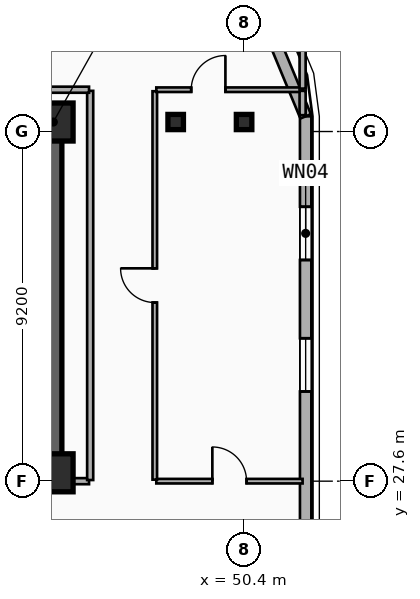
"""IFC4 building model, lengths in metres.
Left out: names, types, materials, properties, quantities, classifications, styles, units other than length and angle.
Written with IfcOpenShell. Run it as: python <this file> out.ifc"""

import sys

from ifc_helpers import new_model, si_unit, direction, frame, frame_2d, origin, origin_2d, place, context, subcontext, project, spatial, rectangle, i_section, extrude, element, fill, save


model = new_model("IFC4")
c1 = context("Model", 3, precision=1e-05, world=origin(), true_north=direction((0.0, 1.0)))
c2 = subcontext(c1, "Body", "Model", "MODEL_VIEW")
j1 = project(units=[si_unit("LENGTHUNIT", "METRE"), si_unit("PLANEANGLEUNIT", "RADIAN")], contexts=[c1])
p1 = place(None, origin())
s1 = spatial("IfcSite", under=j1, at=p1, CompositionType="ELEMENT")
p2 = place(p1, origin())
s2 = spatial("IfcBuilding", under=s1, at=p2, CompositionType="ELEMENT")
p3 = place(p2, frame((0.0, 0.0, 214.8)))
s3 = spatial("IfcBuildingStorey", under=s2, at=p3, CompositionType="ELEMENT", Elevation=214.8)
p4 = place(p3, frame((12.15, 37.05, 0.0), z_axis=(0.0, 0.0, 1.0), x_axis=(1.0, 0.0, 0.0)))
e1 = element("IfcWall", 1, at=p4, inside=s3, PredefinedType="SHEAR", context=c2, shape_type="SweptSolid", body=[
    extrude(rectangle(XDim=33.23, YDim=0.45, at=frame_2d((16.615, 0.0))), origin(), (0.0, 0.0, 1.0), 3.6),
])
p5 = place(p3, frame((45.38, 27.82, 0.0), z_axis=(0.0, 0.0, 1.0), x_axis=(-1.0, 0.0, 0.0)))
e2 = element("IfcWall", 2, at=p5, inside=s3, PredefinedType="SHEAR", context=c2, shape_type="SweptSolid", body=[
    extrude(rectangle(XDim=12.23, YDim=0.45, at=frame_2d((6.115, 0.0))), origin(), (0.0, 0.0, 1.0), 3.6),
])
p6 = place(p5, frame((9.93, 0.0, 0.0)))
e3 = element("IfcOpeningElement", 3, at=p6, cuts=e2, PredefinedType="OPENING", context=c2, shape_type="SweptSolid", body=[
    extrude(rectangle(XDim=1.1, YDim=2.15, at=frame_2d((0.55, 1.075))), frame((0.0, 0.235, 0.0), z_axis=(0.0, -1.0, 0.0), x_axis=(1.0, 0.0, 0.0)), (0.0, 0.0, 1.0), 0.47),
])
p7 = place(p5, frame((6.23, 0.0, 0.0)))
e4 = element("IfcOpeningElement", 4, at=p7, cuts=e2, PredefinedType="OPENING", context=c2, shape_type="SweptSolid", body=[
    extrude(rectangle(XDim=1.1, YDim=2.15, at=frame_2d((0.55, 1.075))), frame((0.0, 0.235, 0.0), z_axis=(0.0, -1.0, 0.0), x_axis=(1.0, 0.0, 0.0)), (0.0, 0.0, 1.0), 0.47),
])
p8 = place(p3, frame((45.38, 28.045, 0.0), z_axis=(0.0, 0.0, 1.0), x_axis=(0.0, 1.0, 0.0)))
e5 = element("IfcWall", 5, at=p8, inside=s3, PredefinedType="SHEAR", context=c2, shape_type="SweptSolid", body=[
    extrude(rectangle(XDim=8.78, YDim=0.45, at=frame_2d((4.39, 0.0))), origin(), (0.0, 0.0, 1.0), 3.6),
])
for number, where, z_axis, x_axis in (
    (6, (45.4, 27.82, 0.0), (0.0, 0.0, 1.0), (1.0, 0.0, 0.0)),
    (7, (45.4, 37.05, 0.0), (0.0, 0.0, 1.0), (1.0, 0.0, 0.0)),
):
    element("IfcColumn", number, at=place(p3, frame(where, z_axis=z_axis, x_axis=x_axis)), inside=s3, PredefinedType="COLUMN", context=c2, shape_type="SweptSolid", body=[
        extrude(rectangle(XDim=1.0, YDim=1.0, at=origin_2d()), origin(), (0.0, 0.0, 1.0), 3.6),
    ])
for number, where, z_axis, x_axis in (
    (8, (48.6, 37.05, 0.0), (0.0, 0.0, 1.0), (1.0, 0.0, 0.0)),
    (9, (50.4, 37.05, 0.0), (0.0, 0.0, 1.0), (1.0, 0.0, 0.0)),
):
    element("IfcColumn", number, at=place(p3, frame(where, z_axis=z_axis, x_axis=x_axis)), inside=s3, PredefinedType="COLUMN", context=c2, shape_type="SweptSolid", body=[
        extrude(i_section(OverallWidth=0.408, OverallDepth=0.4, WebThickness=0.025, FlangeThickness=0.039, FilletRadius=0.015, at=origin_2d()), origin(), (0.0, 0.0, 1.0), 3.6),
    ])
p9 = place(p3, frame((52.02, 37.2, 0.0), z_axis=(0.0, 0.0, 1.0), x_axis=(0.0, -1.0, 0.0)))
e10 = element("IfcWall", 10, at=p9, inside=s3, PredefinedType="SOLIDWALL", context=c2, shape_type="SweptSolid", body=[
    extrude(rectangle(XDim=28.6, YDim=0.3, at=frame_2d((14.3, 0.0))), origin(), (0.0, 0.0, 1.0), 3.34),
])
p10 = place(p9, frame((2.38, 0.0, 0.34)))
e11 = element("IfcOpeningElement", 11, at=p10, cuts=e10, PredefinedType="OPENING", context=c2, shape_type="SweptSolid", body=[
    extrude(rectangle(XDim=1.4, YDim=2.1, at=frame_2d((0.7, 1.05))), frame((0.0, 0.16, 0.0), z_axis=(0.0, -1.0, 0.0), x_axis=(1.0, 0.0, 0.0)), (0.0, 0.0, 1.0), 0.32),
])
p11 = place(p9, frame((5.84, 0.0, 0.34)))
e12 = element("IfcOpeningElement", 12, at=p11, cuts=e10, PredefinedType="OPENING", context=c2, shape_type="SweptSolid", body=[
    extrude(rectangle(XDim=1.4, YDim=2.1, at=frame_2d((0.7, 1.05))), frame((0.0, 0.16, 0.0), z_axis=(0.0, -1.0, 0.0), x_axis=(1.0, 0.0, 0.0)), (0.0, 0.0, 1.0), 0.32),
])
p12 = place(p9, frame((21.635, 0.0, 0.34)))
e13 = element("IfcOpeningElement", 13, at=p12, cuts=e10, PredefinedType="OPENING", context=c2, shape_type="SweptSolid", body=[
    extrude(rectangle(XDim=1.4, YDim=2.1, at=frame_2d((0.7, 1.05))), frame((0.0, 0.16, 0.0), z_axis=(0.0, -1.0, 0.0), x_axis=(1.0, 0.0, 0.0)), (0.0, 0.0, 1.0), 0.32),
])
p13 = place(p9, frame((24.957, 0.0, 0.34)))
e14 = element("IfcOpeningElement", 14, at=p13, cuts=e10, PredefinedType="OPENING", context=c2, shape_type="SweptSolid", body=[
    extrude(rectangle(XDim=1.4, YDim=2.1, at=frame_2d((0.7, 1.05))), frame((0.0, 0.16, 0.0), z_axis=(0.0, -1.0, 0.0), x_axis=(1.0, 0.0, 0.0)), (0.0, 0.0, 1.0), 0.32),
])
p14 = place(p3, frame((50.843, 40.042, 0.0), z_axis=(0.0, 0.0, 1.0), x_axis=(0.382704529509, -0.923870793506, 0.0)))
e15 = element("IfcWall", 15, at=p14, inside=s3, PredefinedType="SOLIDWALL", context=c2, shape_type="SweptSolid", body=[
    extrude(rectangle(XDim=3.077, YDim=0.3, at=frame_2d((1.538, 0.0))), origin(), (0.0, 0.0, 1.0), 3.34),
])
p15 = place(p3, frame((48.09, 27.6, 0.0), z_axis=(0.0, 0.0, 1.0), x_axis=(1.0, 0.0, 0.0)))
e16 = element("IfcWall", 16, at=p15, inside=s3, PredefinedType="PARTITIONING", context=c2, shape_type="SweptSolid", body=[
    extrude(rectangle(XDim=3.85, YDim=0.12, at=frame_2d((1.925, 0.0))), origin(), (0.0, 0.0, 1.0), 2.67),
])
p16 = place(p15, frame((1.475, 0.0, 0.0)))
e17 = element("IfcOpeningElement", 17, at=p16, cuts=e16, PredefinedType="OPENING", context=c2, shape_type="SweptSolid", body=[
    extrude(rectangle(XDim=0.9, YDim=2.1, at=frame_2d((0.45, 1.05))), frame((0.0, 0.07, 0.0), z_axis=(0.0, -1.0, 0.0), x_axis=(1.0, 0.0, 0.0)), (0.0, 0.0, 1.0), 0.14),
])
p17 = place(p3, frame((48.05, 27.64, 0.0), z_axis=(0.0, 0.0, 1.0), x_axis=(0.0, 1.0, 0.0)))
e18 = element("IfcWall", 18, at=p17, inside=s3, PredefinedType="PARTITIONING", context=c2, shape_type="SweptSolid", body=[
    extrude(rectangle(XDim=10.22, YDim=0.12, at=frame_2d((5.11, 0.0))), origin(), (0.0, 0.0, 1.0), 2.82),
])
p18 = place(p17, frame((4.66, 0.0, 0.0)))
e19 = element("IfcOpeningElement", 19, at=p18, cuts=e18, PredefinedType="OPENING", context=c2, shape_type="SweptSolid", body=[
    extrude(rectangle(XDim=0.9, YDim=2.1, at=frame_2d((0.45, 1.05))), frame((0.0, 0.07, 0.0), z_axis=(0.0, -1.0, 0.0), x_axis=(1.0, 0.0, 0.0)), (0.0, 0.0, 1.0), 0.14),
])
p19 = place(p3, frame((48.09, 37.9, 0.0), z_axis=(0.0, 0.0, 1.0), x_axis=(1.0, 0.0, 0.0)))
e20 = element("IfcWall", 20, at=p19, inside=s3, PredefinedType="PARTITIONING", context=c2, shape_type="SweptSolid", body=[
    extrude(rectangle(XDim=3.85, YDim=0.12, at=frame_2d((1.925, 0.0))), origin(), (0.0, 0.0, 1.0), 3.34),
])
p20 = place(p19, frame((0.919, 0.0, 0.0)))
e21 = element("IfcOpeningElement", 21, at=p20, cuts=e20, PredefinedType="OPENING", context=c2, shape_type="SweptSolid", body=[
    extrude(rectangle(XDim=0.9, YDim=2.1, at=frame_2d((0.45, 1.05))), frame((0.0, 0.07, 0.0), z_axis=(0.0, -1.0, 0.0), x_axis=(1.0, 0.0, 0.0)), (0.0, 0.0, 1.0), 0.14),
])
p21 = place(p3, frame((45.41, 27.6, 0.0), z_axis=(0.0, 0.0, 1.0), x_axis=(1.0, 0.0, 0.0)))
e22 = element("IfcWall", 22, at=p21, inside=s3, PredefinedType="PARTITIONING", context=c2, shape_type="SweptSolid", body=[
    extrude(rectangle(XDim=0.91, YDim=0.16, at=frame_2d((0.455, 0.0))), origin(), (0.0, 0.0, 1.0), 2.41),
])
p22 = place(p3, frame((46.35, 27.63, 0.0), z_axis=(0.0, 0.0, 1.0), x_axis=(0.0, 1.0, 0.0)))
e23 = element("IfcWall", 23, at=p22, inside=s3, PredefinedType="PARTITIONING", context=c2, shape_type="SweptSolid", body=[
    extrude(rectangle(XDim=10.24, YDim=0.16, at=frame_2d((5.12, 0.0))), origin(), (0.0, 0.0, 1.0), 2.82),
])
p23 = place(p3, frame((11.28, 37.9, 0.0), z_axis=(0.0, 0.0, 1.0), x_axis=(1.0, 0.0, 0.0)))
e24 = element("IfcWall", 24, at=p23, inside=s3, PredefinedType="PARTITIONING", context=c2, shape_type="SweptSolid", body=[
    extrude(rectangle(XDim=35.04, YDim=0.16, at=frame_2d((17.52, 0.0))), origin(), (0.0, 0.0, 1.0), 3.34),
])
p24 = place(p3, frame((51.94, 37.93, 0.0), z_axis=(0.0, 0.0, 1.0), x_axis=(0.0, 1.0, 0.0)))
e25 = element("IfcWall", 25, at=p24, inside=s3, PredefinedType="PARTITIONING", context=c2, shape_type="SweptSolid", body=[
    extrude(rectangle(XDim=1.44, YDim=0.16, at=frame_2d((0.72, 0.0))), origin(), (0.0, 0.0, 1.0), 3.34),
])
p25 = place(p3, frame((51.94, 37.23, 0.0), z_axis=(0.0, 0.0, 1.0), x_axis=(0.0, 1.0, 0.0)))
e26 = element("IfcWall", 26, at=p25, inside=s3, PredefinedType="PARTITIONING", context=c2, shape_type="SweptSolid", body=[
    extrude(rectangle(XDim=0.64, YDim=0.16, at=frame_2d((0.32, 0.0))), origin(), (0.0, 0.0, 1.0), 3.34),
])
p26 = place(p10, origin())
e27 = element("IfcWindow", 27, at=p26, inside=s3, PartitioningType="SINGLE_PANEL", PredefinedType="WINDOW", context=c2, shape_type="SweptSolid", body=[
    extrude(rectangle(XDim=1.4, YDim=2.1, at=frame_2d((0.7, 1.05))), frame((0.0, 0.03, 0.0), z_axis=(0.0, -1.0, 0.0), x_axis=(1.0, 0.0, 0.0)), (0.0, 0.0, 1.0), 0.06),
])
fill(e11, e27)
p27 = place(p11, origin())
e28 = element("IfcWindow", 28, at=p27, inside=s3, PartitioningType="SINGLE_PANEL", PredefinedType="WINDOW", context=c2, shape_type="SweptSolid", body=[
    extrude(rectangle(XDim=1.4, YDim=2.1, at=frame_2d((0.7, 1.05))), frame((0.0, 0.03, 0.0), z_axis=(0.0, -1.0, 0.0), x_axis=(1.0, 0.0, 0.0)), (0.0, 0.0, 1.0), 0.06),
])
fill(e12, e28)
p28 = place(p16, origin())
e29 = element("IfcDoor", 29, at=p28, inside=s3, OperationType="SINGLE_SWING_LEFT", PredefinedType="DOOR", context=c2, shape_type="SweptSolid", body=[
    extrude(rectangle(XDim=0.9, YDim=2.1, at=frame_2d((0.45, 1.05))), frame((0.0, 0.025, 0.0), z_axis=(0.0, -1.0, 0.0), x_axis=(1.0, 0.0, 0.0)), (0.0, 0.0, 1.0), 0.05),
])
fill(e17, e29)
p29 = place(p18, origin())
e30 = element("IfcDoor", 30, at=p29, inside=s3, OperationType="SINGLE_SWING_RIGHT", PredefinedType="DOOR", context=c2, shape_type="SweptSolid", body=[
    extrude(rectangle(XDim=0.9, YDim=2.1, at=frame_2d((0.45, 1.05))), frame((0.0, 0.025, 0.0), z_axis=(0.0, -1.0, 0.0), x_axis=(1.0, 0.0, 0.0)), (0.0, 0.0, 1.0), 0.05),
])
fill(e19, e30)
p30 = place(p20, origin())
e31 = element("IfcDoor", 31, at=p30, inside=s3, OperationType="SINGLE_SWING_RIGHT", PredefinedType="DOOR", context=c2, shape_type="SweptSolid", body=[
    extrude(rectangle(XDim=0.9, YDim=2.1, at=frame_2d((0.45, 1.05))), frame((0.0, 0.025, 0.0), z_axis=(0.0, -1.0, 0.0), x_axis=(1.0, 0.0, 0.0)), (0.0, 0.0, 1.0), 0.05),
])
fill(e21, e31)
save(model, sys.argv[1])
